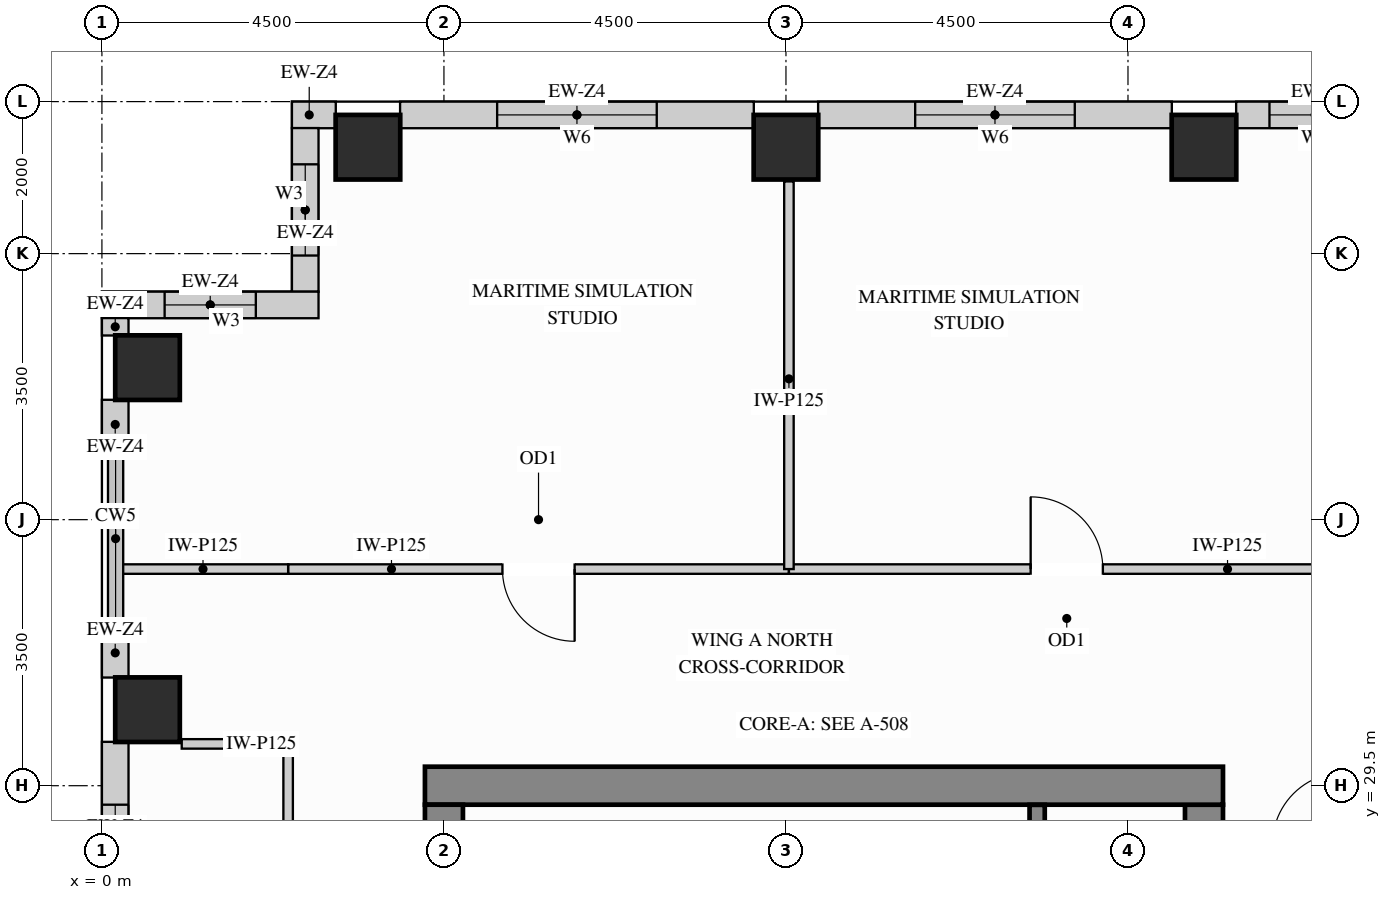
"""IFC4 building model, lengths in metres.
Left out: names, types, materials, properties, quantities, classifications, styles, units other than length and angle.
Written with IfcOpenShell. Run it as: python <this file> out.ifc"""

import sys

from ifc_helpers import new_model, si_unit, direction, frame, frame_2d, origin, origin_2d, place, context, subcontext, project, spatial, rectangle, extrude, source, transform, mapped, element, fill, save


model = new_model("IFC4")
c1 = context("Model", 3, precision=1e-05, world=origin(), true_north=direction((0.0, 1.0)))
c2 = subcontext(c1, "Body", "Model", "MODEL_VIEW")
j1 = project(units=[si_unit("LENGTHUNIT", "METRE"), si_unit("PLANEANGLEUNIT", "RADIAN")], contexts=[c1])
p1 = place(None, origin())
s1 = spatial("IfcSite", under=j1, at=p1, CompositionType="ELEMENT")
p2 = place(p1, origin())
s2 = spatial("IfcBuilding", under=s1, at=p2, CompositionType="ELEMENT")
p3 = place(p2, frame((0.0, 0.0, 266.4)))
s3 = spatial("IfcBuildingStorey", under=s2, at=p3, CompositionType="ELEMENT", Elevation=266.4)
m1 = source(origin(), c2, "Body", "SweptSolid", [
    extrude(rectangle(XDim=0.85, YDim=0.85, at=origin_2d()), origin(), (0.0, 0.0, 1.0), 3.4),
])
for number, where, z_axis, x_axis in (
    (1, (14.5, 37.9, 0.0), (0.0, 0.0, 1.0), (1.0, 0.0, 0.0)),
    (2, (3.5, 37.9, 0.0), (0.0, 0.0, 1.0), (1.0, 0.0, 0.0)),
    (3, (9.0, 37.9, 0.0), (0.0, 0.0, 1.0), (1.0, 0.0, 0.0)),
    (4, (0.6, 30.5, 0.0), (0.0, 0.0, 1.0), (1.0, 0.0, 0.0)),
    (5, (0.6, 35.0, 0.0), (0.0, 0.0, 1.0), (1.0, 0.0, 0.0)),
):
    element("IfcColumn", number, at=place(p3, frame(where, z_axis=z_axis, x_axis=x_axis)), inside=s3, PredefinedType="COLUMN", context=c2, shape_type="MappedRepresentation", body=[
        mapped(m1, transform((0.0, 0.0, 0.0), x_axis=(1.0, 0.0, 0.0), y_axis=(0.0, 1.0, 0.0), z_axis=(0.0, 0.0, 1.0))),
    ])
m2 = source(origin(), c2, "Body", "SweptSolid", [
    extrude(rectangle(XDim=8.37, YDim=0.5, at=frame_2d((4.185, 0.0))), origin(), (0.0, 0.0, 1.0), 3.4),
])
p4 = place(p3, frame((14.5, 20.88, 0.0), z_axis=(0.0, 0.0, 1.0), x_axis=(0.0, 1.0, 0.0)))
e6 = element("IfcWall", 6, at=p4, inside=s3, PredefinedType="SHEAR", context=c2, shape_type="MappedRepresentation", body=[
    mapped(m2, transform((0.0, 0.0, 0.0), x_axis=(1.0, 0.0, 0.0), y_axis=(0.0, 1.0, 0.0), z_axis=(0.0, 0.0, 1.0))),
])
m3 = source(origin(), c2, "Body", "SweptSolid", [
    extrude(rectangle(XDim=10.5, YDim=0.5, at=frame_2d((5.25, 0.0))), origin(), (0.0, 0.0, 1.0), 3.4),
])
p5 = place(p3, frame((4.25, 29.5, 0.0), z_axis=(0.0, 0.0, 1.0), x_axis=(1.0, 0.0, 0.0)))
e7 = element("IfcWall", 7, at=p5, inside=s3, PredefinedType="SHEAR", context=c2, shape_type="MappedRepresentation", body=[
    mapped(m3, transform((0.0, 0.0, 0.0), x_axis=(1.0, 0.0, 0.0), y_axis=(0.0, 1.0, 0.0), z_axis=(0.0, 0.0, 1.0))),
])
m4 = source(origin(), c2, "Body", "SweptSolid", [
    extrude(rectangle(XDim=20.5, YDim=0.5, at=frame_2d((10.25, 0.0))), origin(), (0.0, 0.0, 1.0), 3.4),
])
p6 = place(p3, frame((4.5, 8.75, 0.0), z_axis=(0.0, 0.0, 1.0), x_axis=(0.0, 1.0, 0.0)))
e8 = element("IfcWall", 8, at=p6, inside=s3, PredefinedType="SHEAR", context=c2, shape_type="MappedRepresentation", body=[
    mapped(m4, transform((0.0, 0.0, 0.0), x_axis=(1.0, 0.0, 0.0), y_axis=(0.0, 1.0, 0.0), z_axis=(0.0, 0.0, 1.0))),
])
p7 = place(p3, frame((17.0, 38.325, 0.0), z_axis=(0.0, 0.0, 1.0), x_axis=(-1.0, 0.0, 0.0)))
e9 = element("IfcWall", 9, at=p7, inside=s3, PredefinedType="SOLIDWALL", context=c2, shape_type="SweptSolid", body=[
    extrude(rectangle(XDim=2.077, YDim=0.35, at=frame_2d((1.039, 0.0))), origin(), (0.0, 0.0, 1.0), 3.385),
])
p8 = place(p7, frame((0.438, 0.0, 0.78)))
e10 = element("IfcOpeningElement", 10, at=p8, cuts=e9, PredefinedType="OPENING", context=c2, shape_type="SweptSolid", body=[
    extrude(rectangle(XDim=1.2, YDim=2.25, at=frame_2d((0.6, 1.125))), frame((0.0, 0.185, 0.0), z_axis=(0.0, -1.0, 0.0), x_axis=(1.0, 0.0, 0.0)), (0.0, 0.0, 1.0), 0.37),
])
p9 = place(p3, frame((14.077, 38.325, 0.0), z_axis=(0.0, 0.0, 1.0), x_axis=(-1.0, 0.0, 0.0)))
e11 = element("IfcWall", 11, at=p9, inside=s3, PredefinedType="SOLIDWALL", context=c2, shape_type="SweptSolid", body=[
    extrude(rectangle(XDim=4.654, YDim=0.35, at=frame_2d((2.327, 0.0))), origin(), (0.0, 0.0, 1.0), 3.385),
])
p10 = place(p9, frame((1.277, 0.0, 0.78)))
e12 = element("IfcOpeningElement", 12, at=p10, cuts=e11, PredefinedType="OPENING", context=c2, shape_type="SweptSolid", body=[
    extrude(rectangle(XDim=2.1, YDim=2.25, at=frame_2d((1.05, 1.125))), frame((0.0, 0.185, 0.0), z_axis=(0.0, -1.0, 0.0), x_axis=(1.0, 0.0, 0.0)), (0.0, 0.0, 1.0), 0.37),
])
p11 = place(p3, frame((8.577, 38.325, 0.0), z_axis=(0.0, 0.0, 1.0), x_axis=(-1.0, 0.0, 0.0)))
e13 = element("IfcWall", 13, at=p11, inside=s3, PredefinedType="SOLIDWALL", context=c2, shape_type="SweptSolid", body=[
    extrude(rectangle(XDim=4.654, YDim=0.35, at=frame_2d((2.327, 0.0))), origin(), (0.0, 0.0, 1.0), 3.385),
])
p12 = place(p11, frame((1.277, 0.0, 0.78)))
e14 = element("IfcOpeningElement", 14, at=p12, cuts=e13, PredefinedType="OPENING", context=c2, shape_type="SweptSolid", body=[
    extrude(rectangle(XDim=2.1, YDim=2.25, at=frame_2d((1.05, 1.125))), frame((0.0, 0.185, 0.0), z_axis=(0.0, -1.0, 0.0), x_axis=(1.0, 0.0, 0.0)), (0.0, 0.0, 1.0), 0.37),
])
m5 = source(origin(), c2, "Body", "SweptSolid", [
    extrude(rectangle(XDim=0.577, YDim=0.35, at=frame_2d((0.289, 0.0))), origin(), (0.0, 0.0, 1.0), 3.385),
])
p13 = place(p3, frame((3.077, 38.325, 0.0), z_axis=(0.0, 0.0, 1.0), x_axis=(-1.0, 0.0, 0.0)))
e15 = element("IfcWall", 15, at=p13, inside=s3, PredefinedType="SOLIDWALL", context=c2, shape_type="MappedRepresentation", body=[
    mapped(m5, transform((0.0, 0.0, 0.0), x_axis=(1.0, 0.0, 0.0), y_axis=(0.0, 1.0, 0.0), z_axis=(0.0, 0.0, 1.0))),
])
p14 = place(p3, frame((2.675, 38.152, 0.0), z_axis=(0.0, 0.0, 1.0), x_axis=(0.0, -1.0, 0.0)))
e16 = element("IfcWall", 16, at=p14, inside=s3, PredefinedType="SOLIDWALL", context=c2, shape_type="SweptSolid", body=[
    extrude(rectangle(XDim=2.154, YDim=0.35, at=frame_2d((1.077, 0.0))), origin(), (0.0, 0.0, 1.0), 3.385),
])
p15 = place(p14, frame((0.477, 0.0, 0.78)))
e17 = element("IfcOpeningElement", 17, at=p15, cuts=e16, PredefinedType="OPENING", context=c2, shape_type="SweptSolid", body=[
    extrude(rectangle(XDim=1.2, YDim=2.25, at=frame_2d((0.6, 1.125))), frame((0.0, 0.185, 0.0), z_axis=(0.0, -1.0, 0.0), x_axis=(1.0, 0.0, 0.0)), (0.0, 0.0, 1.0), 0.37),
])
p16 = place(p3, frame((2.85, 35.825, 0.0), z_axis=(0.0, 0.0, 1.0), x_axis=(-1.0, 0.0, 0.0)))
e18 = element("IfcWall", 18, at=p16, inside=s3, PredefinedType="SOLIDWALL", context=c2, shape_type="SweptSolid", body=[
    extrude(rectangle(XDim=2.85, YDim=0.35, at=frame_2d((1.425, 0.0))), origin(), (0.0, 0.0, 1.0), 3.385),
])
p17 = place(p16, frame((0.825, 0.0, 0.78)))
e19 = element("IfcOpeningElement", 19, at=p17, cuts=e18, PredefinedType="OPENING", context=c2, shape_type="SweptSolid", body=[
    extrude(rectangle(XDim=1.2, YDim=2.25, at=frame_2d((0.6, 1.125))), frame((0.0, 0.185, 0.0), z_axis=(0.0, -1.0, 0.0), x_axis=(1.0, 0.0, 0.0)), (0.0, 0.0, 1.0), 0.37),
])
m6 = source(origin(), c2, "Body", "SweptSolid", [
    extrude(rectangle(XDim=0.229, YDim=0.35, at=frame_2d((0.115, 0.0))), origin(), (0.0, 0.0, 1.0), 3.385),
])
p18 = place(p3, frame((0.175, 35.652, 0.0), z_axis=(0.0, 0.0, 1.0), x_axis=(0.0, -1.0, 0.0)))
e20 = element("IfcWall", 20, at=p18, inside=s3, PredefinedType="SOLIDWALL", context=c2, shape_type="MappedRepresentation", body=[
    mapped(m6, transform((0.0, 0.0, 0.0), x_axis=(1.0, 0.0, 0.0), y_axis=(0.0, 1.0, 0.0), z_axis=(0.0, 0.0, 1.0))),
])
m7 = source(origin(), c2, "Body", "SweptSolid", [
    extrude(rectangle(XDim=0.527, YDim=0.35, at=frame_2d((0.263, 0.0))), origin(), (0.0, 0.0, 1.0), 3.385),
])
for number, where, z_axis, x_axis in (
    (21, (0.175, 34.577, 0.0), (0.0, 0.0, 1.0), (0.0, -1.0, 0.0)),
    (22, (0.175, 31.45, 0.0), (0.0, 0.0, 1.0), (0.0, -1.0, 0.0)),
):
    element("IfcWall", number, at=place(p3, frame(where, z_axis=z_axis, x_axis=x_axis)), inside=s3, PredefinedType="SOLIDWALL", context=c2, shape_type="MappedRepresentation", body=[
        mapped(m7, transform((0.0, 0.0, 0.0), x_axis=(1.0, 0.0, 0.0), y_axis=(0.0, 1.0, 0.0), z_axis=(0.0, 0.0, 1.0))),
    ])
p19 = place(p3, frame((0.175, 30.077, 0.0), z_axis=(0.0, 0.0, 1.0), x_axis=(0.0, -1.0, 0.0)))
e23 = element("IfcWall", 23, at=p19, inside=s3, PredefinedType="SOLIDWALL", context=c2, shape_type="SweptSolid", body=[
    extrude(rectangle(XDim=2.854, YDim=0.35, at=frame_2d((1.427, 0.0))), origin(), (0.0, 0.0, 1.0), 3.385),
])
p20 = place(p19, frame((0.827, 0.0, 0.78)))
e24 = element("IfcOpeningElement", 24, at=p20, cuts=e23, PredefinedType="OPENING", context=c2, shape_type="SweptSolid", body=[
    extrude(rectangle(XDim=1.2, YDim=2.25, at=frame_2d((0.6, 1.125))), frame((0.0, 0.185, 0.0), z_axis=(0.0, -1.0, 0.0), x_axis=(1.0, 0.0, 0.0)), (0.0, 0.0, 1.0), 0.37),
])
p21 = place(p3, frame((2.45, 32.35, 0.0), z_axis=(0.0, 0.0, 1.0), x_axis=(1.0, 0.0, 0.0)))
e25 = element("IfcWall", 25, at=p21, inside=s3, PredefinedType="PARTITIONING", context=c2, shape_type="SweptSolid", body=[
    extrude(rectangle(XDim=6.589, YDim=0.125, at=frame_2d((3.294, 0.0))), origin(), (0.0, 0.0, 1.0), 3.385),
])
p22 = place(p21, frame((2.82, 0.0, 0.0)))
e26 = element("IfcOpeningElement", 26, at=p22, cuts=e25, PredefinedType="OPENING", context=c2, shape_type="SweptSolid", body=[
    extrude(rectangle(XDim=0.95, YDim=2.15, at=frame_2d((0.475, 1.075))), frame((0.0, 0.073, 0.0), z_axis=(0.0, -1.0, 0.0), x_axis=(1.0, 0.0, 0.0)), (0.0, 0.0, 1.0), 0.145),
])
p23 = place(p3, frame((9.039, 32.35, 0.0), z_axis=(0.0, 0.0, 1.0), x_axis=(1.0, 0.0, 0.0)))
e27 = element("IfcWall", 27, at=p23, inside=s3, PredefinedType="PARTITIONING", context=c2, shape_type="SweptSolid", body=[
    extrude(rectangle(XDim=7.311, YDim=0.125, at=frame_2d((3.656, 0.0))), origin(), (0.0, 0.0, 1.0), 3.385),
])
p24 = place(p23, frame((3.18, 0.0, 0.0)))
e28 = element("IfcOpeningElement", 28, at=p24, cuts=e27, PredefinedType="OPENING", context=c2, shape_type="SweptSolid", body=[
    extrude(rectangle(XDim=0.95, YDim=2.15, at=frame_2d((0.475, 1.075))), frame((0.0, 0.073, 0.0), z_axis=(0.0, -1.0, 0.0), x_axis=(1.0, 0.0, 0.0)), (0.0, 0.0, 1.0), 0.145),
])
m8 = source(origin(), c2, "Body", "SweptSolid", [
    extrude(rectangle(XDim=2.24, YDim=0.125, at=frame_2d((1.12, 0.0))), origin(), (0.0, 0.0, 1.0), 3.385),
])
p25 = place(p3, frame((0.21, 32.35, 0.0), z_axis=(0.0, 0.0, 1.0), x_axis=(1.0, 0.0, 0.0)))
e29 = element("IfcWall", 29, at=p25, inside=s3, PredefinedType="PARTITIONING", context=c2, shape_type="MappedRepresentation", body=[
    mapped(m8, transform((0.0, 0.0, 0.0), x_axis=(1.0, 0.0, 0.0), y_axis=(0.0, 1.0, 0.0), z_axis=(0.0, 0.0, 1.0))),
])
m9 = source(origin(), c2, "Body", "SweptSolid", [
    extrude(rectangle(XDim=5.1, YDim=0.125, at=frame_2d((2.55, 0.0))), origin(), (0.0, 0.0, 1.0), 3.385),
])
p26 = place(p3, frame((9.039, 32.35, 0.0), z_axis=(0.0, 0.0, 1.0), x_axis=(0.0, 1.0, 0.0)))
e30 = element("IfcWall", 30, at=p26, inside=s3, PredefinedType="PARTITIONING", context=c2, shape_type="MappedRepresentation", body=[
    mapped(m9, transform((0.0, 0.0, 0.0), x_axis=(1.0, 0.0, 0.0), y_axis=(0.0, 1.0, 0.0), z_axis=(0.0, 0.0, 1.0))),
])
m10 = source(origin(), c2, "Body", "SweptSolid", [
    extrude(rectangle(XDim=1.4, YDim=0.125, at=frame_2d((0.7, 0.0))), origin(), (0.0, 0.0, 1.0), 3.385),
])
p27 = place(p3, frame((1.05, 30.05, 0.0), z_axis=(0.0, 0.0, 1.0), x_axis=(1.0, 0.0, 0.0)))
e31 = element("IfcWall", 31, at=p27, inside=s3, PredefinedType="PARTITIONING", context=c2, shape_type="MappedRepresentation", body=[
    mapped(m10, transform((0.0, 0.0, 0.0), x_axis=(1.0, 0.0, 0.0), y_axis=(0.0, 1.0, 0.0), z_axis=(0.0, 0.0, 1.0))),
])
p28 = place(p3, frame((2.45, 22.6, 0.0), z_axis=(0.0, 0.0, 1.0), x_axis=(0.0, 1.0, 0.0)))
e32 = element("IfcWall", 32, at=p28, inside=s3, PredefinedType="PARTITIONING", context=c2, shape_type="SweptSolid", body=[
    extrude(rectangle(XDim=7.45, YDim=0.125, at=frame_2d((3.725, 0.0))), origin(), (0.0, 0.0, 1.0), 3.385),
])
p29 = place(p28, frame((3.25, 0.0, 0.0)))
e33 = element("IfcOpeningElement", 33, at=p29, cuts=e32, PredefinedType="OPENING", context=c2, shape_type="SweptSolid", body=[
    extrude(rectangle(XDim=0.95, YDim=2.15, at=frame_2d((0.475, 1.075))), frame((0.0, 0.073, 0.0), z_axis=(0.0, -1.0, 0.0), x_axis=(1.0, 0.0, 0.0)), (0.0, 0.0, 1.0), 0.145),
])
m11 = source(origin(), c2, "Body", "SweptSolid", [
    extrude(rectangle(XDim=3.803, YDim=0.2, at=frame_2d((1.901, 0.0))), origin(), (0.0, 0.0, 1.0), 3.4),
])
p30 = place(p3, frame((12.305, 25.445, 0.0), z_axis=(0.0, 0.0, 1.0), x_axis=(0.0, 1.0, 0.0)))
e34 = element("IfcWall", 34, at=p30, inside=s3, PredefinedType="SHEAR", context=c2, shape_type="MappedRepresentation", body=[
    mapped(m11, transform((0.0, 0.0, 0.0), x_axis=(1.0, 0.0, 0.0), y_axis=(0.0, 1.0, 0.0), z_axis=(0.0, 0.0, 1.0))),
])
m12 = source(origin(), c2, "Body", "SweptSolid", [
    extrude(rectangle(XDim=0.95, YDim=2.15, at=frame_2d((0.475, 1.075))), frame((0.0, 0.025, 0.0), z_axis=(0.0, -1.0, 0.0), x_axis=(1.0, 0.0, 0.0)), (0.0, 0.0, 1.0), 0.05),
])
p31 = place(p22, origin())
e35 = element("IfcDoor", 35, at=p31, inside=s3, OperationType="SINGLE_SWING_RIGHT", PredefinedType="DOOR", context=c2, shape_type="MappedRepresentation", body=[
    mapped(m12, transform((0.0, 0.0, 0.0), x_axis=(1.0, 0.0, 0.0), y_axis=(0.0, 1.0, 0.0), z_axis=(0.0, 0.0, 1.0))),
])
fill(e26, e35)
p32 = place(p24, origin())
e36 = element("IfcDoor", 36, at=p32, inside=s3, OperationType="SINGLE_SWING_LEFT", PredefinedType="DOOR", context=c2, shape_type="MappedRepresentation", body=[
    mapped(m12, transform((0.0, 0.0, 0.0), x_axis=(1.0, 0.0, 0.0), y_axis=(0.0, 1.0, 0.0), z_axis=(0.0, 0.0, 1.0))),
])
fill(e28, e36)
m13 = source(origin(), c2, "Body", "SweptSolid", [
    extrude(rectangle(XDim=1.2, YDim=2.25, at=frame_2d((0.6, 1.125))), frame((0.0, 0.03, 0.0), z_axis=(0.0, -1.0, 0.0), x_axis=(1.0, 0.0, 0.0)), (0.0, 0.0, 1.0), 0.06),
])
p33 = place(p8, origin())
e37 = element("IfcWindow", 37, at=p33, inside=s3, PartitioningType="SINGLE_PANEL", PredefinedType="WINDOW", context=c2, shape_type="MappedRepresentation", body=[
    mapped(m13, transform((0.0, 0.0, 0.0), x_axis=(1.0, 0.0, 0.0), y_axis=(0.0, 1.0, 0.0), z_axis=(0.0, 0.0, 1.0))),
])
fill(e10, e37)
p34 = place(p15, origin())
e38 = element("IfcWindow", 38, at=p34, inside=s3, PartitioningType="SINGLE_PANEL", PredefinedType="WINDOW", context=c2, shape_type="MappedRepresentation", body=[
    mapped(m13, transform((0.0, 0.0, 0.0), x_axis=(1.0, 0.0, 0.0), y_axis=(0.0, 1.0, 0.0), z_axis=(0.0, 0.0, 1.0))),
])
fill(e17, e38)
p35 = place(p17, origin())
e39 = element("IfcWindow", 39, at=p35, inside=s3, PartitioningType="SINGLE_PANEL", PredefinedType="WINDOW", context=c2, shape_type="MappedRepresentation", body=[
    mapped(m13, transform((0.0, 0.0, 0.0), x_axis=(1.0, 0.0, 0.0), y_axis=(0.0, 1.0, 0.0), z_axis=(0.0, 0.0, 1.0))),
])
fill(e19, e39)
p36 = place(p20, origin())
e40 = element("IfcWindow", 40, at=p36, inside=s3, PartitioningType="SINGLE_PANEL", PredefinedType="WINDOW", context=c2, shape_type="MappedRepresentation", body=[
    mapped(m13, transform((0.0, 0.0, 0.0), x_axis=(1.0, 0.0, 0.0), y_axis=(0.0, 1.0, 0.0), z_axis=(0.0, 0.0, 1.0))),
])
fill(e24, e40)
m14 = source(origin(), c2, "Body", "SweptSolid", [
    extrude(rectangle(XDim=2.1, YDim=2.25, at=frame_2d((1.05, 1.125))), frame((0.0, 0.03, 0.0), z_axis=(0.0, -1.0, 0.0), x_axis=(1.0, 0.0, 0.0)), (0.0, 0.0, 1.0), 0.06),
])
p37 = place(p10, origin())
e41 = element("IfcWindow", 41, at=p37, inside=s3, PartitioningType="SINGLE_PANEL", PredefinedType="WINDOW", context=c2, shape_type="MappedRepresentation", body=[
    mapped(m14, transform((0.0, 0.0, 0.0), x_axis=(1.0, 0.0, 0.0), y_axis=(0.0, 1.0, 0.0), z_axis=(0.0, 0.0, 1.0))),
])
fill(e12, e41)
p38 = place(p12, origin())
e42 = element("IfcWindow", 42, at=p38, inside=s3, PartitioningType="SINGLE_PANEL", PredefinedType="WINDOW", context=c2, shape_type="MappedRepresentation", body=[
    mapped(m14, transform((0.0, 0.0, 0.0), x_axis=(1.0, 0.0, 0.0), y_axis=(0.0, 1.0, 0.0), z_axis=(0.0, 0.0, 1.0))),
])
fill(e14, e42)
save(model, sys.argv[1])
